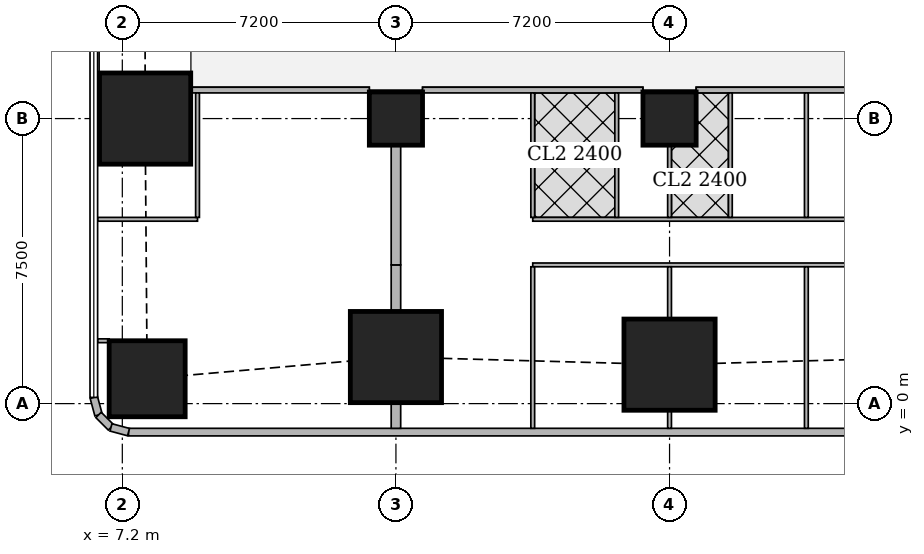
"""IFC4 building model, lengths in metres.
Left out: names, types, materials, properties, quantities, classifications, styles, units other than length and angle.
Written with IfcOpenShell. Run it as: python <this file> out.ifc"""

import sys

from ifc_helpers import new_model, si_unit, direction, frame, frame_2d, origin, origin_2d, place, context, subcontext, project, spatial, rectangle, extrude, element, fill, save


model = new_model("IFC4")
c1 = context("Model", 3, precision=1e-05, world=origin(), true_north=direction((0.0, 1.0)))
c2 = subcontext(c1, "Body", "Model", "MODEL_VIEW")
j1 = project(units=[si_unit("LENGTHUNIT", "METRE"), si_unit("PLANEANGLEUNIT", "RADIAN")], contexts=[c1])
p1 = place(None, origin())
s1 = spatial("IfcSite", under=j1, at=p1, CompositionType="ELEMENT")
p2 = place(p1, origin())
s2 = spatial("IfcBuilding", under=s1, at=p2, CompositionType="ELEMENT")
p3 = place(p2, frame((0.0, 0.0, 193.7)))
s3 = spatial("IfcBuildingStorey", under=s2, at=p3, CompositionType="ELEMENT", Elevation=193.7)
p4 = place(p3, frame((7.854, 0.654, 0.0), z_axis=(0.0, 0.0, 1.0), x_axis=(1.0, 0.0, 0.0)))
e1 = element("IfcColumn", 1, at=p4, inside=s3, PredefinedType="COLUMN", context=c2, shape_type="SweptSolid", body=[
    extrude(rectangle(XDim=2.0, YDim=2.0, at=origin_2d()), origin(), (0.0, 0.0, 1.0), 3.75),
])
for number, where, z_axis, x_axis in (
    (2, (14.4, 1.225, 0.0), (0.0, 0.0, 1.0), (1.0, 0.0, 0.0)),
    (3, (21.6, 1.025, 0.0), (0.0, 0.0, 1.0), (1.0, 0.0, 0.0)),
    (4, (7.8, 7.5, 0.0), (0.0, 0.0, 1.0), (1.0, 0.0, 0.0)),
):
    element("IfcColumn", number, at=place(p3, frame(where, z_axis=z_axis, x_axis=x_axis)), inside=s3, PredefinedType="COLUMN", context=c2, shape_type="SweptSolid", body=[
        extrude(rectangle(XDim=2.4, YDim=2.4, at=origin_2d()), origin(), (0.0, 0.0, 1.0), 3.75),
    ])
for number, where, z_axis, x_axis in (
    (5, (14.4, 7.5, 0.0), (0.0, 0.0, 1.0), (1.0, 0.0, 0.0)),
    (6, (21.6, 7.5, 0.0), (0.0, 0.0, 1.0), (1.0, 0.0, 0.0)),
):
    element("IfcColumn", number, at=place(p3, frame(where, z_axis=z_axis, x_axis=x_axis)), inside=s3, PredefinedType="COLUMN", context=c2, shape_type="SweptSolid", body=[
        extrude(rectangle(XDim=1.4, YDim=1.4, at=origin_2d()), origin(), (0.0, 0.0, 1.0), 3.75),
    ])
p5 = place(p3, frame((7.363, -0.75, 0.0), z_axis=(0.0, 0.0, 1.0), x_axis=(1.0, 0.0, 0.0)))
e7 = element("IfcWall", 7, at=p5, inside=s3, PredefinedType="SOLIDWALL", context=c2, shape_type="SweptSolid", body=[
    extrude(rectangle(XDim=40.428, YDim=0.2, at=frame_2d((20.214, 0.0))), origin(), (0.0, 0.0, 1.0), 3.5),
])
p6 = place(p5, frame((2.319, 0.0, 0.9)))
e8 = element("IfcOpeningElement", 8, at=p6, cuts=e7, PredefinedType="OPENING", context=c2, shape_type="SweptSolid", body=[
    extrude(rectangle(XDim=2.4, YDim=1.5, at=frame_2d((1.2, 0.75))), frame((0.0, 0.11, 0.0), z_axis=(0.0, -1.0, 0.0), x_axis=(1.0, 0.0, 0.0)), (0.0, 0.0, 1.0), 0.22),
])
p7 = place(p5, frame((7.937, 0.0, 0.9)))
e9 = element("IfcOpeningElement", 9, at=p7, cuts=e7, PredefinedType="OPENING", context=c2, shape_type="SweptSolid", body=[
    extrude(rectangle(XDim=1.8, YDim=1.5, at=frame_2d((0.9, 0.75))), frame((0.0, 0.11, 0.0), z_axis=(0.0, -1.0, 0.0), x_axis=(1.0, 0.0, 0.0)), (0.0, 0.0, 1.0), 0.22),
])
p8 = place(p5, frame((11.537, 0.0, 0.9)))
e10 = element("IfcOpeningElement", 10, at=p8, cuts=e7, PredefinedType="OPENING", context=c2, shape_type="SweptSolid", body=[
    extrude(rectangle(XDim=1.8, YDim=1.5, at=frame_2d((0.9, 0.75))), frame((0.0, 0.11, 0.0), z_axis=(0.0, -1.0, 0.0), x_axis=(1.0, 0.0, 0.0)), (0.0, 0.0, 1.0), 0.22),
])
p9 = place(p5, frame((15.137, 0.0, 0.9)))
e11 = element("IfcOpeningElement", 11, at=p9, cuts=e7, PredefinedType="OPENING", context=c2, shape_type="SweptSolid", body=[
    extrude(rectangle(XDim=1.8, YDim=1.5, at=frame_2d((0.9, 0.75))), frame((0.0, 0.11, 0.0), z_axis=(0.0, -1.0, 0.0), x_axis=(1.0, 0.0, 0.0)), (0.0, 0.0, 1.0), 0.22),
])
p10 = place(p5, frame((18.737, 0.0, 0.9)))
e12 = element("IfcOpeningElement", 12, at=p10, cuts=e7, PredefinedType="OPENING", context=c2, shape_type="SweptSolid", body=[
    extrude(rectangle(XDim=1.8, YDim=1.5, at=frame_2d((0.9, 0.75))), frame((0.0, 0.11, 0.0), z_axis=(0.0, -1.0, 0.0), x_axis=(1.0, 0.0, 0.0)), (0.0, 0.0, 1.0), 0.22),
])
p11 = place(p5, frame((22.337, 0.0, 0.9)))
e13 = element("IfcOpeningElement", 13, at=p11, cuts=e7, PredefinedType="OPENING", context=c2, shape_type="SweptSolid", body=[
    extrude(rectangle(XDim=1.8, YDim=1.5, at=frame_2d((0.9, 0.75))), frame((0.0, 0.11, 0.0), z_axis=(0.0, -1.0, 0.0), x_axis=(1.0, 0.0, 0.0)), (0.0, 0.0, 1.0), 0.22),
])
p12 = place(p5, frame((25.937, 0.0, 0.9)))
e14 = element("IfcOpeningElement", 14, at=p12, cuts=e7, PredefinedType="OPENING", context=c2, shape_type="SweptSolid", body=[
    extrude(rectangle(XDim=1.8, YDim=1.5, at=frame_2d((0.9, 0.75))), frame((0.0, 0.11, 0.0), z_axis=(0.0, -1.0, 0.0), x_axis=(1.0, 0.0, 0.0)), (0.0, 0.0, 1.0), 0.22),
])
p13 = place(p5, frame((29.537, 0.0, 0.9)))
e15 = element("IfcOpeningElement", 15, at=p13, cuts=e7, PredefinedType="OPENING", context=c2, shape_type="SweptSolid", body=[
    extrude(rectangle(XDim=1.8, YDim=1.5, at=frame_2d((0.9, 0.75))), frame((0.0, 0.11, 0.0), z_axis=(0.0, -1.0, 0.0), x_axis=(1.0, 0.0, 0.0)), (0.0, 0.0, 1.0), 0.22),
])
p14 = place(p5, frame((33.137, 0.0, 0.9)))
e16 = element("IfcOpeningElement", 16, at=p14, cuts=e7, PredefinedType="OPENING", context=c2, shape_type="SweptSolid", body=[
    extrude(rectangle(XDim=1.8, YDim=1.5, at=frame_2d((0.9, 0.75))), frame((0.0, 0.11, 0.0), z_axis=(0.0, -1.0, 0.0), x_axis=(1.0, 0.0, 0.0)), (0.0, 0.0, 1.0), 0.22),
])
p15 = place(p3, frame((6.45, 0.163, 0.0), z_axis=(0.0, 0.0, 1.0), x_axis=(0.259698463175, -0.965689757751, 0.0)))
e17 = element("IfcWall", 17, at=p15, inside=s3, PredefinedType="SOLIDWALL", context=c2, shape_type="SweptSolid", body=[
    extrude(rectangle(XDim=0.478, YDim=0.2, at=frame_2d((0.239, 0.0))), origin(), (0.0, 0.0, 1.0), 3.5),
])
p16 = place(p3, frame((6.574, -0.298, 0.0), z_axis=(0.0, 0.0, 1.0), x_axis=(0.707369890659, -0.706843573776, 0.0)))
e18 = element("IfcWall", 18, at=p16, inside=s3, PredefinedType="SOLIDWALL", context=c2, shape_type="SweptSolid", body=[
    extrude(rectangle(XDim=0.464, YDim=0.2, at=frame_2d((0.232, 0.0))), origin(), (0.0, 0.0, 1.0), 3.5),
])
p17 = place(p3, frame((6.902, -0.626, 0.0), z_axis=(0.0, 0.0, 1.0), x_axis=(0.965655254015, -0.259826731483, 0.0)))
e19 = element("IfcWall", 19, at=p17, inside=s3, PredefinedType="SOLIDWALL", context=c2, shape_type="SweptSolid", body=[
    extrude(rectangle(XDim=0.477, YDim=0.2, at=frame_2d((0.239, 0.0))), origin(), (0.0, 0.0, 1.0), 3.5),
])
p18 = place(p3, frame((28.099, 8.25, 0.0), z_axis=(0.0, 0.0, 1.0), x_axis=(-1.0, 0.0, 0.0)))
e20 = element("IfcWall", 20, at=p18, inside=s3, PredefinedType="SOLIDWALL", context=c2, shape_type="SweptSolid", body=[
    extrude(rectangle(XDim=5.798, YDim=0.15, at=frame_2d((2.899, 0.0))), origin(), (0.0, 0.0, 1.0), 3.5),
])
p19 = place(p3, frame((20.899, 8.25, 0.0), z_axis=(0.0, 0.0, 1.0), x_axis=(-1.0, 0.0, 0.0)))
e21 = element("IfcWall", 21, at=p19, inside=s3, PredefinedType="SOLIDWALL", context=c2, shape_type="SweptSolid", body=[
    extrude(rectangle(XDim=5.798, YDim=0.15, at=frame_2d((2.899, 0.0))), origin(), (0.0, 0.0, 1.0), 3.5),
])
p20 = place(p19, frame((3.999, 0.0, 0.0)))
e22 = element("IfcOpeningElement", 22, at=p20, cuts=e21, PredefinedType="OPENING", context=c2, shape_type="SweptSolid", body=[
    extrude(rectangle(XDim=1.0, YDim=2.1, at=frame_2d((0.5, 1.05))), frame((0.0, 0.085, 0.0), z_axis=(0.0, -1.0, 0.0), x_axis=(1.0, 0.0, 0.0)), (0.0, 0.0, 1.0), 0.17),
])
p21 = place(p3, frame((13.699, 8.25, 0.0), z_axis=(0.0, 0.0, 1.0), x_axis=(-1.0, 0.0, 0.0)))
e23 = element("IfcWall", 23, at=p21, inside=s3, PredefinedType="SOLIDWALL", context=c2, shape_type="SweptSolid", body=[
    extrude(rectangle(XDim=4.698, YDim=0.15, at=frame_2d((2.349, 0.0))), origin(), (0.0, 0.0, 1.0), 3.5),
])
p22 = place(p21, frame((3.345, 0.0, 0.0)))
e24 = element("IfcOpeningElement", 24, at=p22, cuts=e23, PredefinedType="OPENING", context=c2, shape_type="SweptSolid", body=[
    extrude(rectangle(XDim=1.0, YDim=2.1, at=frame_2d((0.5, 1.05))), frame((0.0, 0.085, 0.0), z_axis=(0.0, -1.0, 0.0), x_axis=(1.0, 0.0, 0.0)), (0.0, 0.0, 1.0), 0.17),
])
p23 = place(p3, frame((6.55, 1.654, 0.0), z_axis=(0.0, 0.0, 1.0), x_axis=(1.0, 0.0, 0.0)))
e25 = element("IfcWall", 25, at=p23, inside=s3, PredefinedType="PARTITIONING", context=c2, shape_type="SweptSolid", body=[
    extrude(rectangle(XDim=0.304, YDim=0.1, at=frame_2d((0.152, 0.0))), origin(), (0.0, 0.0, 1.0), 2.05),
])
p24 = place(p3, frame((9.179, 4.85, 0.0), z_axis=(0.0, 0.0, 1.0), x_axis=(-1.0, 0.0, 0.0)))
e26 = element("IfcWall", 26, at=p24, inside=s3, PredefinedType="PARTITIONING", context=c2, shape_type="SweptSolid", body=[
    extrude(rectangle(XDim=2.629, YDim=0.1, at=frame_2d((1.314, 0.0))), origin(), (0.0, 0.0, 1.0), 2.05),
])
p25 = place(p3, frame((9.179, 4.9, 0.0), z_axis=(0.0, 0.0, 1.0), x_axis=(0.0, 1.0, 0.0)))
e27 = element("IfcWall", 27, at=p25, inside=s3, PredefinedType="PARTITIONING", context=c2, shape_type="SweptSolid", body=[
    extrude(rectangle(XDim=3.275, YDim=0.1, at=frame_2d((1.638, 0.0))), origin(), (0.0, 0.0, 1.0), 3.5),
])
p26 = place(p25, frame((0.15, 0.0, 0.0)))
e28 = element("IfcOpeningElement", 28, at=p26, cuts=e27, PredefinedType="OPENING", context=c2, shape_type="SweptSolid", body=[
    extrude(rectangle(XDim=0.9, YDim=2.1, at=frame_2d((0.45, 1.05))), frame((0.0, 0.06, 0.0), z_axis=(0.0, -1.0, 0.0), x_axis=(1.0, 0.0, 0.0)), (0.0, 0.0, 1.0), 0.12),
])
p27 = place(p3, frame((28.675, 3.65, 0.0), z_axis=(0.0, 0.0, 1.0), x_axis=(-1.0, 0.0, 0.0)))
e29 = element("IfcWall", 29, at=p27, inside=s3, PredefinedType="PARTITIONING", context=c2, shape_type="SweptSolid", body=[
    extrude(rectangle(XDim=10.675, YDim=0.1, at=frame_2d((5.337, 0.0))), origin(), (0.0, 0.0, 1.0), 3.5),
])
p28 = place(p27, frame((9.575, 0.0, 0.0)))
e30 = element("IfcOpeningElement", 30, at=p28, cuts=e29, PredefinedType="OPENING", context=c2, shape_type="SweptSolid", body=[
    extrude(rectangle(XDim=0.9, YDim=2.1, at=frame_2d((0.45, 1.05))), frame((0.0, 0.06, 0.0), z_axis=(0.0, -1.0, 0.0), x_axis=(1.0, 0.0, 0.0)), (0.0, 0.0, 1.0), 0.12),
])
p29 = place(p27, frame((5.975, 0.0, 0.0)))
e31 = element("IfcOpeningElement", 31, at=p29, cuts=e29, PredefinedType="OPENING", context=c2, shape_type="SweptSolid", body=[
    extrude(rectangle(XDim=0.9, YDim=2.1, at=frame_2d((0.45, 1.05))), frame((0.0, 0.06, 0.0), z_axis=(0.0, -1.0, 0.0), x_axis=(1.0, 0.0, 0.0)), (0.0, 0.0, 1.0), 0.12),
])
p30 = place(p27, frame((2.375, 0.0, 0.0)))
e32 = element("IfcOpeningElement", 32, at=p30, cuts=e29, PredefinedType="OPENING", context=c2, shape_type="SweptSolid", body=[
    extrude(rectangle(XDim=0.9, YDim=2.1, at=frame_2d((0.45, 1.05))), frame((0.0, 0.06, 0.0), z_axis=(0.0, -1.0, 0.0), x_axis=(1.0, 0.0, 0.0)), (0.0, 0.0, 1.0), 0.12),
])
p31 = place(p3, frame((28.675, 4.85, 0.0), z_axis=(0.0, 0.0, 1.0), x_axis=(-1.0, 0.0, 0.0)))
e33 = element("IfcWall", 33, at=p31, inside=s3, PredefinedType="PARTITIONING", context=c2, shape_type="SweptSolid", body=[
    extrude(rectangle(XDim=10.675, YDim=0.1, at=frame_2d((5.337, 0.0))), origin(), (0.0, 0.0, 1.0), 3.5),
])
p32 = place(p31, frame((9.12, 0.0, 0.0)))
e34 = element("IfcOpeningElement", 34, at=p32, cuts=e33, PredefinedType="OPENING", context=c2, shape_type="SweptSolid", body=[
    extrude(rectangle(XDim=0.9, YDim=2.1, at=frame_2d((0.45, 1.05))), frame((0.0, 0.06, 0.0), z_axis=(0.0, -1.0, 0.0), x_axis=(1.0, 0.0, 0.0)), (0.0, 0.0, 1.0), 0.12),
])
p33 = place(p31, frame((5.825, 0.0, 0.0)))
e35 = element("IfcOpeningElement", 35, at=p33, cuts=e33, PredefinedType="OPENING", context=c2, shape_type="SweptSolid", body=[
    extrude(rectangle(XDim=0.9, YDim=2.1, at=frame_2d((0.45, 1.05))), frame((0.0, 0.06, 0.0), z_axis=(0.0, -1.0, 0.0), x_axis=(1.0, 0.0, 0.0)), (0.0, 0.0, 1.0), 0.12),
])
p34 = place(p31, frame((2.115, 0.0, 0.0)))
e36 = element("IfcOpeningElement", 36, at=p34, cuts=e33, PredefinedType="OPENING", context=c2, shape_type="SweptSolid", body=[
    extrude(rectangle(XDim=0.9, YDim=2.1, at=frame_2d((0.45, 1.05))), frame((0.0, 0.06, 0.0), z_axis=(0.0, -1.0, 0.0), x_axis=(1.0, 0.0, 0.0)), (0.0, 0.0, 1.0), 0.12),
])
p35 = place(p31, frame((7.32, 0.0, 0.0)))
e37 = element("IfcOpeningElement", 37, at=p35, cuts=e33, PredefinedType="OPENING", context=c2, shape_type="SweptSolid", body=[
    extrude(rectangle(XDim=0.9, YDim=2.1, at=frame_2d((0.45, 1.05))), frame((0.0, 0.06, 0.0), z_axis=(0.0, -1.0, 0.0), x_axis=(1.0, 0.0, 0.0)), (0.0, 0.0, 1.0), 0.12),
])
p36 = place(p31, frame((4.025, 0.0, 0.0)))
e38 = element("IfcOpeningElement", 38, at=p36, cuts=e33, PredefinedType="OPENING", context=c2, shape_type="SweptSolid", body=[
    extrude(rectangle(XDim=0.9, YDim=2.1, at=frame_2d((0.45, 1.05))), frame((0.0, 0.06, 0.0), z_axis=(0.0, -1.0, 0.0), x_axis=(1.0, 0.0, 0.0)), (0.0, 0.0, 1.0), 0.12),
])
p37 = place(p31, frame((0.315, 0.0, 0.0)))
e39 = element("IfcOpeningElement", 39, at=p37, cuts=e33, PredefinedType="OPENING", context=c2, shape_type="SweptSolid", body=[
    extrude(rectangle(XDim=0.9, YDim=2.1, at=frame_2d((0.45, 1.05))), frame((0.0, 0.06, 0.0), z_axis=(0.0, -1.0, 0.0), x_axis=(1.0, 0.0, 0.0)), (0.0, 0.0, 1.0), 0.12),
])
p38 = place(p3, frame((18.0, -0.65, 0.0), z_axis=(0.0, 0.0, 1.0), x_axis=(0.0, 1.0, 0.0)))
e40 = element("IfcWall", 40, at=p38, inside=s3, PredefinedType="PARTITIONING", context=c2, shape_type="SweptSolid", body=[
    extrude(rectangle(XDim=4.25, YDim=0.1, at=frame_2d((2.125, 0.0))), origin(), (0.0, 0.0, 1.0), 2.05),
])
p39 = place(p3, frame((21.6, -0.65, 0.0), z_axis=(0.0, 0.0, 1.0), x_axis=(0.0, 1.0, 0.0)))
e41 = element("IfcWall", 41, at=p39, inside=s3, PredefinedType="PARTITIONING", context=c2, shape_type="SweptSolid", body=[
    extrude(rectangle(XDim=0.474, YDim=0.1, at=frame_2d((0.237, 0.0))), origin(), (0.0, 0.0, 1.0), 3.5),
])
p40 = place(p3, frame((21.6, 2.226, 0.0), z_axis=(0.0, 0.0, 1.0), x_axis=(0.0, 1.0, 0.0)))
e42 = element("IfcWall", 42, at=p40, inside=s3, PredefinedType="PARTITIONING", context=c2, shape_type="SweptSolid", body=[
    extrude(rectangle(XDim=1.374, YDim=0.1, at=frame_2d((0.687, 0.0))), origin(), (0.0, 0.0, 1.0), 3.5),
])
p41 = place(p3, frame((25.2, -0.65, 0.0), z_axis=(0.0, 0.0, 1.0), x_axis=(0.0, 1.0, 0.0)))
e43 = element("IfcWall", 43, at=p41, inside=s3, PredefinedType="PARTITIONING", context=c2, shape_type="SweptSolid", body=[
    extrude(rectangle(XDim=4.25, YDim=0.1, at=frame_2d((2.125, 0.0))), origin(), (0.0, 0.0, 1.0), 2.05),
])
p42 = place(p3, frame((18.0, 4.9, 0.0), z_axis=(0.0, 0.0, 1.0), x_axis=(0.0, 1.0, 0.0)))
e44 = element("IfcWall", 44, at=p42, inside=s3, PredefinedType="PARTITIONING", context=c2, shape_type="SweptSolid", body=[
    extrude(rectangle(XDim=3.275, YDim=0.1, at=frame_2d((1.638, 0.0))), origin(), (0.0, 0.0, 1.0), 3.5),
])
p43 = place(p3, frame((21.6, 4.9, 0.0), z_axis=(0.0, 0.0, 1.0), x_axis=(0.0, 1.0, 0.0)))
e45 = element("IfcWall", 45, at=p43, inside=s3, PredefinedType="PARTITIONING", context=c2, shape_type="SweptSolid", body=[
    extrude(rectangle(XDim=1.899, YDim=0.1, at=frame_2d((0.95, 0.0))), origin(), (0.0, 0.0, 1.0), 3.5),
])
for number, where, z_axis, x_axis in (
    (46, (25.2, 4.9, 0.0), (0.0, 0.0, 1.0), (0.0, 1.0, 0.0)),
    (47, (20.21, 4.9, 0.0), (0.0, 0.0, 1.0), (0.0, 1.0, 0.0)),
    (48, (23.2, 4.9, 0.0), (0.0, 0.0, 1.0), (0.0, 1.0, 0.0)),
):
    element("IfcWall", number, at=place(p3, frame(where, z_axis=z_axis, x_axis=x_axis)), inside=s3, PredefinedType="PARTITIONING", context=c2, shape_type="SweptSolid", body=[
        extrude(rectangle(XDim=3.275, YDim=0.1, at=frame_2d((1.638, 0.0))), origin(), (0.0, 0.0, 1.0), 3.5),
    ])
p44 = place(p3, frame((14.4, -0.65, 0.0), z_axis=(0.0, 0.0, 1.0), x_axis=(0.0, 1.0, 0.0)))
e49 = element("IfcWall", 49, at=p44, inside=s3, PredefinedType="SOLIDWALL", context=c2, shape_type="SweptSolid", body=[
    extrude(rectangle(XDim=0.674, YDim=0.25, at=frame_2d((0.337, 0.0))), origin(), (0.0, 0.0, 1.0), 2.05),
])
p45 = place(p3, frame((14.4, 2.426, 0.0), z_axis=(0.0, 0.0, 1.0), x_axis=(0.0, 1.0, 0.0)))
e50 = element("IfcWall", 50, at=p45, inside=s3, PredefinedType="SOLIDWALL", context=c2, shape_type="SweptSolid", body=[
    extrude(rectangle(XDim=1.224, YDim=0.25, at=frame_2d((0.612, 0.0))), origin(), (0.0, 0.0, 1.0), 2.05),
])
p46 = place(p3, frame((14.4, 3.65, 0.0), z_axis=(0.0, 0.0, 1.0), x_axis=(0.0, 1.0, 0.0)))
e51 = element("IfcWall", 51, at=p46, inside=s3, PredefinedType="SOLIDWALL", context=c2, shape_type="SweptSolid", body=[
    extrude(rectangle(XDim=3.149, YDim=0.25, at=frame_2d((1.575, 0.0))), origin(), (0.0, 0.0, 1.0), 3.5),
])
p47 = place(p6, origin())
e52 = element("IfcWindow", 52, at=p47, inside=s3, PartitioningType="SINGLE_PANEL", PredefinedType="WINDOW", context=c2, shape_type="SweptSolid", body=[
    extrude(rectangle(XDim=2.4, YDim=1.5, at=frame_2d((1.2, 0.75))), frame((0.0, 0.03, 0.0), z_axis=(0.0, -1.0, 0.0), x_axis=(1.0, 0.0, 0.0)), (0.0, 0.0, 1.0), 0.06),
])
fill(e8, e52)
p48 = place(p7, origin())
e53 = element("IfcWindow", 53, at=p48, inside=s3, PartitioningType="SINGLE_PANEL", PredefinedType="WINDOW", context=c2, shape_type="SweptSolid", body=[
    extrude(rectangle(XDim=1.8, YDim=1.5, at=frame_2d((0.9, 0.75))), frame((0.0, 0.03, 0.0), z_axis=(0.0, -1.0, 0.0), x_axis=(1.0, 0.0, 0.0)), (0.0, 0.0, 1.0), 0.06),
])
fill(e9, e53)
p49 = place(p8, origin())
e54 = element("IfcWindow", 54, at=p49, inside=s3, PartitioningType="SINGLE_PANEL", PredefinedType="WINDOW", context=c2, shape_type="SweptSolid", body=[
    extrude(rectangle(XDim=1.8, YDim=1.5, at=frame_2d((0.9, 0.75))), frame((0.0, 0.03, 0.0), z_axis=(0.0, -1.0, 0.0), x_axis=(1.0, 0.0, 0.0)), (0.0, 0.0, 1.0), 0.06),
])
fill(e10, e54)
p50 = place(p9, origin())
e55 = element("IfcWindow", 55, at=p50, inside=s3, PartitioningType="SINGLE_PANEL", PredefinedType="WINDOW", context=c2, shape_type="SweptSolid", body=[
    extrude(rectangle(XDim=1.8, YDim=1.5, at=frame_2d((0.9, 0.75))), frame((0.0, 0.03, 0.0), z_axis=(0.0, -1.0, 0.0), x_axis=(1.0, 0.0, 0.0)), (0.0, 0.0, 1.0), 0.06),
])
fill(e11, e55)
p51 = place(p10, origin())
e56 = element("IfcWindow", 56, at=p51, inside=s3, PartitioningType="SINGLE_PANEL", PredefinedType="WINDOW", context=c2, shape_type="SweptSolid", body=[
    extrude(rectangle(XDim=1.8, YDim=1.5, at=frame_2d((0.9, 0.75))), frame((0.0, 0.03, 0.0), z_axis=(0.0, -1.0, 0.0), x_axis=(1.0, 0.0, 0.0)), (0.0, 0.0, 1.0), 0.06),
])
fill(e12, e56)
p52 = place(p26, origin())
e57 = element("IfcDoor", 57, at=p52, inside=s3, OperationType="SINGLE_SWING_LEFT", PredefinedType="DOOR", context=c2, shape_type="SweptSolid", body=[
    extrude(rectangle(XDim=0.9, YDim=2.1, at=frame_2d((0.45, 1.05))), frame((0.0, 0.025, 0.0), z_axis=(0.0, -1.0, 0.0), x_axis=(1.0, 0.0, 0.0)), (0.0, 0.0, 1.0), 0.05),
])
fill(e28, e57)
p53 = place(p22, origin())
e58 = element("IfcDoor", 58, at=p53, inside=s3, OperationType="SINGLE_SWING_RIGHT", PredefinedType="DOOR", context=c2, shape_type="SweptSolid", body=[
    extrude(rectangle(XDim=1.0, YDim=2.1, at=frame_2d((0.5, 1.05))), frame((0.0, 0.025, 0.0), z_axis=(0.0, -1.0, 0.0), x_axis=(1.0, 0.0, 0.0)), (0.0, 0.0, 1.0), 0.05),
])
fill(e24, e58)
p54 = place(p28, origin())
e59 = element("IfcDoor", 59, at=p54, inside=s3, OperationType="SINGLE_SWING_RIGHT", PredefinedType="DOOR", context=c2, shape_type="SweptSolid", body=[
    extrude(rectangle(XDim=0.9, YDim=2.1, at=frame_2d((0.45, 1.05))), frame((0.0, 0.025, 0.0), z_axis=(0.0, -1.0, 0.0), x_axis=(1.0, 0.0, 0.0)), (0.0, 0.0, 1.0), 0.05),
])
fill(e30, e59)
p55 = place(p29, origin())
e60 = element("IfcDoor", 60, at=p55, inside=s3, OperationType="SINGLE_SWING_RIGHT", PredefinedType="DOOR", context=c2, shape_type="SweptSolid", body=[
    extrude(rectangle(XDim=0.9, YDim=2.1, at=frame_2d((0.45, 1.05))), frame((0.0, 0.025, 0.0), z_axis=(0.0, -1.0, 0.0), x_axis=(1.0, 0.0, 0.0)), (0.0, 0.0, 1.0), 0.05),
])
fill(e31, e60)
p56 = place(p30, origin())
e61 = element("IfcDoor", 61, at=p56, inside=s3, OperationType="SINGLE_SWING_RIGHT", PredefinedType="DOOR", context=c2, shape_type="SweptSolid", body=[
    extrude(rectangle(XDim=0.9, YDim=2.1, at=frame_2d((0.45, 1.05))), frame((0.0, 0.025, 0.0), z_axis=(0.0, -1.0, 0.0), x_axis=(1.0, 0.0, 0.0)), (0.0, 0.0, 1.0), 0.05),
])
fill(e32, e61)
p57 = place(p32, origin())
e62 = element("IfcDoor", 62, at=p57, inside=s3, OperationType="SINGLE_SWING_LEFT", PredefinedType="DOOR", context=c2, shape_type="SweptSolid", body=[
    extrude(rectangle(XDim=0.9, YDim=2.1, at=frame_2d((0.45, 1.05))), frame((0.0, 0.025, 0.0), z_axis=(0.0, -1.0, 0.0), x_axis=(1.0, 0.0, 0.0)), (0.0, 0.0, 1.0), 0.05),
])
fill(e34, e62)
p58 = place(p33, origin())
e63 = element("IfcDoor", 63, at=p58, inside=s3, OperationType="SINGLE_SWING_RIGHT", PredefinedType="DOOR", context=c2, shape_type="SweptSolid", body=[
    extrude(rectangle(XDim=0.9, YDim=2.1, at=frame_2d((0.45, 1.05))), frame((0.0, 0.025, 0.0), z_axis=(0.0, -1.0, 0.0), x_axis=(1.0, 0.0, 0.0)), (0.0, 0.0, 1.0), 0.05),
])
fill(e35, e63)
p59 = place(p34, origin())
e64 = element("IfcDoor", 64, at=p59, inside=s3, OperationType="SINGLE_SWING_RIGHT", PredefinedType="DOOR", context=c2, shape_type="SweptSolid", body=[
    extrude(rectangle(XDim=0.9, YDim=2.1, at=frame_2d((0.45, 1.05))), frame((0.0, 0.025, 0.0), z_axis=(0.0, -1.0, 0.0), x_axis=(1.0, 0.0, 0.0)), (0.0, 0.0, 1.0), 0.05),
])
fill(e36, e64)
p60 = place(p35, origin())
e65 = element("IfcDoor", 65, at=p60, inside=s3, OperationType="SINGLE_SWING_LEFT", PredefinedType="DOOR", context=c2, shape_type="SweptSolid", body=[
    extrude(rectangle(XDim=0.9, YDim=2.1, at=frame_2d((0.45, 1.05))), frame((0.0, 0.025, 0.0), z_axis=(0.0, -1.0, 0.0), x_axis=(1.0, 0.0, 0.0)), (0.0, 0.0, 1.0), 0.05),
])
fill(e37, e65)
p61 = place(p36, origin())
e66 = element("IfcDoor", 66, at=p61, inside=s3, OperationType="SINGLE_SWING_LEFT", PredefinedType="DOOR", context=c2, shape_type="SweptSolid", body=[
    extrude(rectangle(XDim=0.9, YDim=2.1, at=frame_2d((0.45, 1.05))), frame((0.0, 0.025, 0.0), z_axis=(0.0, -1.0, 0.0), x_axis=(1.0, 0.0, 0.0)), (0.0, 0.0, 1.0), 0.05),
])
fill(e38, e66)
p62 = place(p20, origin())
e67 = element("IfcDoor", 67, at=p62, inside=s3, OperationType="SINGLE_SWING_RIGHT", PredefinedType="DOOR", context=c2, shape_type="SweptSolid", body=[
    extrude(rectangle(XDim=1.0, YDim=2.1, at=frame_2d((0.5, 1.05))), frame((0.0, 0.025, 0.0), z_axis=(0.0, -1.0, 0.0), x_axis=(1.0, 0.0, 0.0)), (0.0, 0.0, 1.0), 0.05),
])
fill(e22, e67)
save(model, sys.argv[1])
